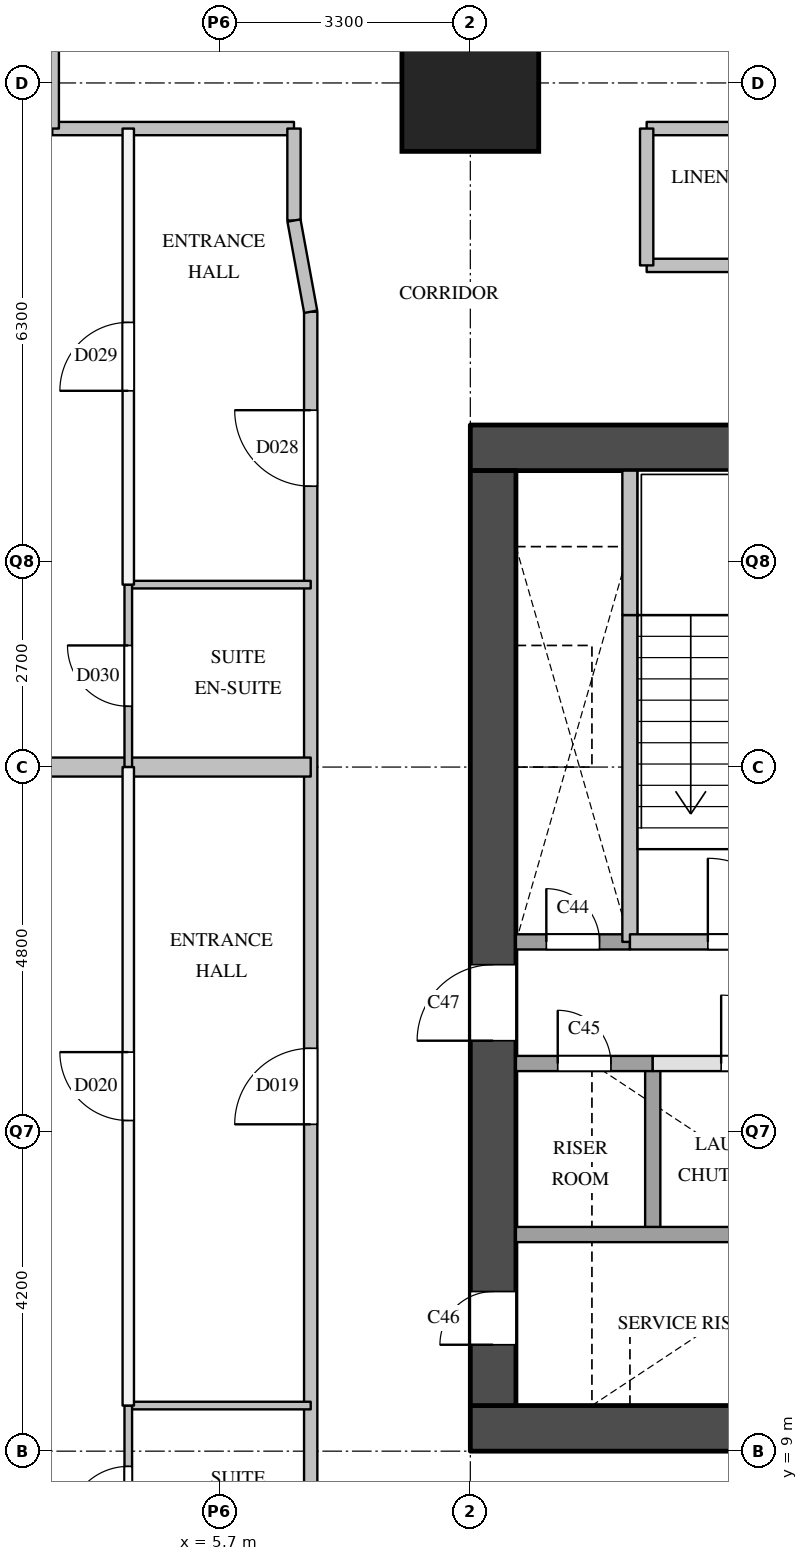
"""IFC4 building model, lengths in metres.
Left out: names, types, materials, properties, quantities, classifications, styles, units other than length and angle.
Written with IfcOpenShell. Run it as: python <this file> out.ifc"""

import sys

from ifc_helpers import new_model, si_unit, direction, frame, frame_2d, origin, origin_2d, place, context, subcontext, project, spatial, rectangle, extrude, element, fill, save


model = new_model("IFC4")
c1 = context("Model", 3, precision=1e-05, world=origin(), true_north=direction((0.0, 1.0)))
c2 = subcontext(c1, "Body", "Model", "MODEL_VIEW")
j1 = project(units=[si_unit("LENGTHUNIT", "METRE"), si_unit("PLANEANGLEUNIT", "RADIAN")], contexts=[c1])
p1 = place(None, origin())
s1 = spatial("IfcSite", under=j1, at=p1, CompositionType="ELEMENT")
p2 = place(p1, origin())
s2 = spatial("IfcBuilding", under=s1, at=p2, CompositionType="ELEMENT")
p3 = place(p2, frame((0.0, 0.0, 69.0)))
s3 = spatial("IfcBuildingStorey", under=s2, at=p3, CompositionType="ELEMENT", Elevation=69.0)
p4 = place(p3, frame((9.0, 27.0, 0.0), z_axis=(0.0, 0.0, 1.0), x_axis=(1.0, 0.0, 0.0)))
e1 = element("IfcColumn", 1, at=p4, inside=s3, PredefinedType="COLUMN", context=c2, shape_type="SweptSolid", body=[
    extrude(rectangle(XDim=1.8, YDim=1.8, at=origin_2d()), origin(), (0.0, 0.0, 1.0), 3.8),
])
for number, where, z_axis, x_axis in (
    (2, (9.0, 9.3, 0.0), (0.0, 0.0, 1.0), (1.0, 0.0, 0.0)),
    (3, (9.0, 22.2, 0.0), (0.0, 0.0, 1.0), (1.0, 0.0, 0.0)),
):
    element("IfcWall", number, at=place(p3, frame(where, z_axis=z_axis, x_axis=x_axis)), inside=s3, PredefinedType="SHEAR", context=c2, shape_type="SweptSolid", body=[
        extrude(rectangle(XDim=9.0, YDim=0.6, at=frame_2d((4.5, 0.0))), origin(), (0.0, 0.0, 1.0), 3.5),
    ])
p5 = place(p3, frame((9.3, 9.6, 0.0), z_axis=(0.0, 0.0, 1.0), x_axis=(0.0, 1.0, 0.0)))
e4 = element("IfcWall", 4, at=p5, inside=s3, PredefinedType="SHEAR", context=c2, shape_type="SweptSolid", body=[
    extrude(rectangle(XDim=12.3, YDim=0.6, at=frame_2d((6.15, 0.0))), origin(), (0.0, 0.0, 1.0), 3.5),
])
p6 = place(p5, frame((0.8, 0.0, 0.0)))
e5 = element("IfcOpeningElement", 5, at=p6, cuts=e4, PredefinedType="OPENING", context=c2, shape_type="SweptSolid", body=[
    extrude(rectangle(XDim=0.7, YDim=2.1, at=frame_2d((0.35, 1.05))), frame((0.0, 0.31, 0.0), z_axis=(0.0, -1.0, 0.0), x_axis=(1.0, 0.0, 0.0)), (0.0, 0.0, 1.0), 0.62),
])
p7 = place(p5, frame((4.8, 0.0, 0.0)))
e6 = element("IfcOpeningElement", 6, at=p7, cuts=e4, PredefinedType="OPENING", context=c2, shape_type="SweptSolid", body=[
    extrude(rectangle(XDim=1.0, YDim=2.1, at=frame_2d((0.5, 1.05))), frame((0.0, 0.31, 0.0), z_axis=(0.0, -1.0, 0.0), x_axis=(1.0, 0.0, 0.0)), (0.0, 0.0, 1.0), 0.62),
])
p8 = place(p3, frame((11.1, 15.7, 0.0), z_axis=(0.0, 0.0, 1.0), x_axis=(0.0, 1.0, 0.0)))
e7 = element("IfcWall", 7, at=p8, inside=s3, PredefinedType="SOLIDWALL", context=c2, shape_type="SweptSolid", body=[
    extrude(rectangle(XDim=4.3, YDim=0.2, at=frame_2d((2.15, 0.0))), origin(), (0.0, 0.0, 1.0), 3.5),
])
p9 = place(p3, frame((11.1, 20.0, 0.0), z_axis=(0.0, 0.0, 1.0), x_axis=(0.0, 1.0, 0.0)))
e8 = element("IfcWall", 8, at=p9, inside=s3, PredefinedType="SOLIDWALL", context=c2, shape_type="SweptSolid", body=[
    extrude(rectangle(XDim=1.9, YDim=0.2, at=frame_2d((0.95, 0.0))), origin(), (0.0, 0.0, 1.0), 3.5),
])
p10 = place(p3, frame((11.4, 11.9, 0.0), z_axis=(0.0, 0.0, 1.0), x_axis=(0.0, 1.0, 0.0)))
e9 = element("IfcWall", 9, at=p10, inside=s3, PredefinedType="SOLIDWALL", context=c2, shape_type="SweptSolid", body=[
    extrude(rectangle(XDim=2.2, YDim=0.2, at=frame_2d((1.1, 0.0))), origin(), (0.0, 0.0, 1.0), 3.5),
])
p11 = place(p3, frame((9.6, 11.85, 0.0), z_axis=(0.0, 0.0, 1.0), x_axis=(1.0, 0.0, 0.0)))
e10 = element("IfcWall", 10, at=p11, inside=s3, PredefinedType="SOLIDWALL", context=c2, shape_type="SweptSolid", body=[
    extrude(rectangle(XDim=7.8, YDim=0.2, at=frame_2d((3.9, 0.0))), origin(), (0.0, 0.0, 1.0), 3.5),
])
p12 = place(p3, frame((11.4, 14.1, 0.0), z_axis=(0.0, 0.0, 1.0), x_axis=(1.0, 0.0, 0.0)))
e11 = element("IfcWall", 11, at=p12, inside=s3, PredefinedType="PARTITIONING", context=c2, shape_type="SweptSolid", body=[
    extrude(rectangle(XDim=6.0, YDim=0.2, at=frame_2d((3.0, 0.0))), origin(), (0.0, 0.0, 1.0), 3.5),
])
p13 = place(p12, frame((0.9, 0.0, 0.0)))
e12 = element("IfcOpeningElement", 12, at=p13, cuts=e11, PredefinedType="OPENING", context=c2, shape_type="SweptSolid", body=[
    extrude(rectangle(XDim=0.9, YDim=2.1, at=frame_2d((0.45, 1.05))), frame((0.0, 0.11, 0.0), z_axis=(0.0, -1.0, 0.0), x_axis=(1.0, 0.0, 0.0)), (0.0, 0.0, 1.0), 0.22),
])
p14 = place(p12, frame((3.9, 0.0, 0.0)))
e13 = element("IfcOpeningElement", 13, at=p14, cuts=e11, PredefinedType="OPENING", context=c2, shape_type="SweptSolid", body=[
    extrude(rectangle(XDim=0.9, YDim=2.1, at=frame_2d((0.45, 1.05))), frame((0.0, 0.11, 0.0), z_axis=(0.0, -1.0, 0.0), x_axis=(1.0, 0.0, 0.0)), (0.0, 0.0, 1.0), 0.22),
])
p15 = place(p3, frame((9.6, 14.1, 0.0), z_axis=(0.0, 0.0, 1.0), x_axis=(1.0, 0.0, 0.0)))
e14 = element("IfcWall", 14, at=p15, inside=s3, PredefinedType="SOLIDWALL", context=c2, shape_type="SweptSolid", body=[
    extrude(rectangle(XDim=1.8, YDim=0.2, at=frame_2d((0.9, 0.0))), origin(), (0.0, 0.0, 1.0), 3.5),
])
p16 = place(p15, frame((0.55, 0.0, 0.0)))
e15 = element("IfcOpeningElement", 15, at=p16, cuts=e14, PredefinedType="OPENING", context=c2, shape_type="SweptSolid", body=[
    extrude(rectangle(XDim=0.7, YDim=2.1, at=frame_2d((0.35, 1.05))), frame((0.0, 0.11, 0.0), z_axis=(0.0, -1.0, 0.0), x_axis=(1.0, 0.0, 0.0)), (0.0, 0.0, 1.0), 0.22),
])
p17 = place(p3, frame((9.6, 15.7, 0.0), z_axis=(0.0, 0.0, 1.0), x_axis=(1.0, 0.0, 0.0)))
e16 = element("IfcWall", 16, at=p17, inside=s3, PredefinedType="SOLIDWALL", context=c2, shape_type="SweptSolid", body=[
    extrude(rectangle(XDim=1.5, YDim=0.2, at=frame_2d((0.75, 0.0))), origin(), (0.0, 0.0, 1.0), 3.5),
])
p18 = place(p17, frame((0.4, 0.0, 0.0)))
e17 = element("IfcOpeningElement", 17, at=p18, cuts=e16, PredefinedType="OPENING", context=c2, shape_type="SweptSolid", body=[
    extrude(rectangle(XDim=0.7, YDim=2.1, at=frame_2d((0.35, 1.05))), frame((0.0, 0.11, 0.0), z_axis=(0.0, -1.0, 0.0), x_axis=(1.0, 0.0, 0.0)), (0.0, 0.0, 1.0), 0.22),
])
p19 = place(p3, frame((11.1, 15.7, 0.0), z_axis=(0.0, 0.0, 1.0), x_axis=(1.0, 0.0, 0.0)))
e18 = element("IfcWall", 18, at=p19, inside=s3, PredefinedType="SOLIDWALL", context=c2, shape_type="SweptSolid", body=[
    extrude(rectangle(XDim=6.3, YDim=0.2, at=frame_2d((3.15, 0.0))), origin(), (0.0, 0.0, 1.0), 3.5),
])
p20 = place(p19, frame((4.175, 0.0, 0.0)))
e19 = element("IfcOpeningElement", 19, at=p20, cuts=e18, PredefinedType="OPENING", context=c2, shape_type="SweptSolid", body=[
    extrude(rectangle(XDim=1.1, YDim=2.1, at=frame_2d((0.55, 1.05))), frame((0.0, 0.11, 0.0), z_axis=(0.0, -1.0, 0.0), x_axis=(1.0, 0.0, 0.0)), (0.0, 0.0, 1.0), 0.22),
])
p21 = place(p19, frame((1.025, 0.0, 0.0)))
e20 = element("IfcOpeningElement", 20, at=p21, cuts=e18, PredefinedType="OPENING", context=c2, shape_type="SweptSolid", body=[
    extrude(rectangle(XDim=1.1, YDim=2.1, at=frame_2d((0.55, 1.05))), frame((0.0, 0.11, 0.0), z_axis=(0.0, -1.0, 0.0), x_axis=(1.0, 0.0, 0.0)), (0.0, 0.0, 1.0), 0.22),
])
p22 = place(p3, frame((11.32, 24.6, 0.0), z_axis=(0.0, 0.0, 1.0), x_axis=(1.0, 0.0, 0.0)))
e21 = element("IfcWall", 21, at=p22, inside=s3, PredefinedType="PARTITIONING", context=c2, shape_type="SweptSolid", body=[
    extrude(rectangle(XDim=4.36, YDim=0.175, at=frame_2d((2.18, 0.0))), origin(), (0.0, 0.0, 1.0), 3.5),
])
p23 = place(p22, frame((1.68, 0.0, 0.0)))
e22 = element("IfcOpeningElement", 22, at=p23, cuts=e21, PredefinedType="OPENING", context=c2, shape_type="SweptSolid", body=[
    extrude(rectangle(XDim=1.0, YDim=2.1, at=frame_2d((0.5, 1.05))), frame((0.0, 0.097, 0.0), z_axis=(0.0, -1.0, 0.0), x_axis=(1.0, 0.0, 0.0)), (0.0, 0.0, 1.0), 0.195),
])
p24 = place(p3, frame((3.5, 26.4, 0.0), z_axis=(0.0, 0.0, 1.0), x_axis=(1.0, 0.0, 0.0)))
e23 = element("IfcWall", 23, at=p24, inside=s3, PredefinedType="PARTITIONING", context=c2, shape_type="SweptSolid", body=[
    extrude(rectangle(XDim=3.18, YDim=0.175, at=frame_2d((1.59, 0.0))), origin(), (0.0, 0.0, 1.0), 3.5),
])
p25 = place(p3, frame((11.32, 26.4, 0.0), z_axis=(0.0, 0.0, 1.0), x_axis=(1.0, 0.0, 0.0)))
e24 = element("IfcWall", 24, at=p25, inside=s3, PredefinedType="PARTITIONING", context=c2, shape_type="SweptSolid", body=[
    extrude(rectangle(XDim=4.36, YDim=0.175, at=frame_2d((2.18, 0.0))), origin(), (0.0, 0.0, 1.0), 3.5),
])
p26 = place(p3, frame((3.5, 26.4, 0.0), z_axis=(0.0, 0.0, 1.0), x_axis=(0.0, 1.0, 0.0)))
e25 = element("IfcWall", 25, at=p26, inside=s3, PredefinedType="PARTITIONING", context=c2, shape_type="SweptSolid", body=[
    extrude(rectangle(XDim=25.7, YDim=0.175, at=frame_2d((12.85, 0.0))), origin(), (0.0, 0.0, 1.0), 2.5),
])
p27 = place(p26, frame((5.55, 0.0, 0.0)))
e26 = element("IfcOpeningElement", 26, at=p27, cuts=e25, PredefinedType="OPENING", context=c2, shape_type="SweptSolid", body=[
    extrude(rectangle(XDim=0.9, YDim=2.1, at=frame_2d((0.45, 1.05))), frame((0.0, 0.097, 0.0), z_axis=(0.0, -1.0, 0.0), x_axis=(1.0, 0.0, 0.0)), (0.0, 0.0, 1.0), 0.195),
])
p28 = place(p26, frame((17.2, 0.0, 0.0)))
e27 = element("IfcOpeningElement", 27, at=p28, cuts=e25, PredefinedType="OPENING", context=c2, shape_type="SweptSolid", body=[
    extrude(rectangle(XDim=0.9, YDim=2.1, at=frame_2d((0.45, 1.05))), frame((0.0, 0.097, 0.0), z_axis=(0.0, -1.0, 0.0), x_axis=(1.0, 0.0, 0.0)), (0.0, 0.0, 1.0), 0.195),
])
p29 = place(p3, frame((6.68, 25.19, 0.0), z_axis=(0.0, 0.0, 1.0), x_axis=(0.0, 1.0, 0.0)))
e28 = element("IfcWall", 28, at=p29, inside=s3, PredefinedType="PARTITIONING", context=c2, shape_type="SweptSolid", body=[
    extrude(rectangle(XDim=1.21, YDim=0.175, at=frame_2d((0.605, 0.0))), origin(), (0.0, 0.0, 1.0), 3.5),
])
p30 = place(p3, frame((6.9, 6.9, 0.0), z_axis=(0.0, 0.0, 1.0), x_axis=(0.0, 1.0, 0.0)))
e29 = element("IfcWall", 29, at=p30, inside=s3, PredefinedType="PARTITIONING", context=c2, shape_type="SweptSolid", body=[
    extrude(rectangle(XDim=17.09, YDim=0.175, at=frame_2d((8.545, 0.0))), origin(), (0.0, 0.0, 1.0), 3.5),
])
p31 = place(p30, frame((6.4, 0.0, 0.0)))
e30 = element("IfcOpeningElement", 30, at=p31, cuts=e29, PredefinedType="OPENING", context=c2, shape_type="SweptSolid", body=[
    extrude(rectangle(XDim=1.0, YDim=2.1, at=frame_2d((0.5, 1.05))), frame((0.0, 0.097, 0.0), z_axis=(0.0, -1.0, 0.0), x_axis=(1.0, 0.0, 0.0)), (0.0, 0.0, 1.0), 0.195),
])
p32 = place(p30, frame((14.795, 0.0, 0.0)))
e31 = element("IfcOpeningElement", 31, at=p32, cuts=e29, PredefinedType="OPENING", context=c2, shape_type="SweptSolid", body=[
    extrude(rectangle(XDim=1.0, YDim=2.1, at=frame_2d((0.5, 1.05))), frame((0.0, 0.097, 0.0), z_axis=(0.0, -1.0, 0.0), x_axis=(1.0, 0.0, 0.0)), (0.0, 0.0, 1.0), 0.195),
])
p33 = place(p3, frame((11.32, 24.6, 0.0), z_axis=(0.0, 0.0, 1.0), x_axis=(0.0, 1.0, 0.0)))
e32 = element("IfcWall", 32, at=p33, inside=s3, PredefinedType="PARTITIONING", context=c2, shape_type="SweptSolid", body=[
    extrude(rectangle(XDim=1.8, YDim=0.175, at=frame_2d((0.9, 0.0))), origin(), (0.0, 0.0, 1.0), 3.5),
])
p34 = place(p3, frame((4.5, 9.6, 0.0), z_axis=(0.0, 0.0, 1.0), x_axis=(0.0, 1.0, 0.0)))
e33 = element("IfcWall", 33, at=p34, inside=s3, PredefinedType="PARTITIONING", context=c2, shape_type="SweptSolid", body=[
    extrude(rectangle(XDim=8.4, YDim=0.15, at=frame_2d((4.2, 0.0))), origin(), (0.0, 0.0, 1.0), 3.5),
])
p35 = place(p34, frame((3.75, 0.0, 0.0)))
e34 = element("IfcOpeningElement", 34, at=p35, cuts=e33, PredefinedType="OPENING", context=c2, shape_type="SweptSolid", body=[
    extrude(rectangle(XDim=0.9, YDim=2.1, at=frame_2d((0.45, 1.05))), frame((0.0, 0.085, 0.0), z_axis=(0.0, -1.0, 0.0), x_axis=(1.0, 0.0, 0.0)), (0.0, 0.0, 1.0), 0.17),
])
p36 = place(p3, frame((4.5, 20.4, 0.0), z_axis=(0.0, 0.0, 1.0), x_axis=(0.0, 1.0, 0.0)))
e35 = element("IfcWall", 35, at=p36, inside=s3, PredefinedType="PARTITIONING", context=c2, shape_type="SweptSolid", body=[
    extrude(rectangle(XDim=6.0, YDim=0.15, at=frame_2d((3.0, 0.0))), origin(), (0.0, 0.0, 1.0), 3.5),
])
p37 = place(p36, frame((2.55, 0.0, 0.0)))
e36 = element("IfcOpeningElement", 36, at=p37, cuts=e35, PredefinedType="OPENING", context=c2, shape_type="SweptSolid", body=[
    extrude(rectangle(XDim=0.9, YDim=2.1, at=frame_2d((0.45, 1.05))), frame((0.0, 0.085, 0.0), z_axis=(0.0, -1.0, 0.0), x_axis=(1.0, 0.0, 0.0)), (0.0, 0.0, 1.0), 0.17),
])
p38 = place(p3, frame((0.0, 18.0, 0.0), z_axis=(0.0, 0.0, 1.0), x_axis=(1.0, 0.0, 0.0)))
e37 = element("IfcWall", 37, at=p38, inside=s3, PredefinedType="PARTITIONING", context=c2, shape_type="SweptSolid", body=[
    extrude(rectangle(XDim=6.9, YDim=0.25, at=frame_2d((3.45, 0.0))), origin(), (0.0, 0.0, 1.0), 3.5),
])
for number, where, z_axis, x_axis in (
    (38, (4.5, 9.6, 0.0), (0.0, 0.0, 1.0), (1.0, 0.0, 0.0)),
    (39, (4.5, 20.4, 0.0), (0.0, 0.0, 1.0), (1.0, 0.0, 0.0)),
):
    element("IfcWall", number, at=place(p3, frame(where, z_axis=z_axis, x_axis=x_axis)), inside=s3, PredefinedType="PARTITIONING", context=c2, shape_type="SweptSolid", body=[
        extrude(rectangle(XDim=2.4, YDim=0.1, at=frame_2d((1.2, 0.0))), origin(), (0.0, 0.0, 1.0), 3.5),
    ])
p39 = place(p3, frame((4.5, 7.2, 0.0), z_axis=(0.0, 0.0, 1.0), x_axis=(0.0, 1.0, 0.0)))
e40 = element("IfcWall", 40, at=p39, inside=s3, PredefinedType="PARTITIONING", context=c2, shape_type="SweptSolid", body=[
    extrude(rectangle(XDim=2.4, YDim=0.1, at=frame_2d((1.2, 0.0))), origin(), (0.0, 0.0, 1.0), 3.5),
])
p40 = place(p39, frame((0.8, 0.0, 0.0)))
e41 = element("IfcOpeningElement", 41, at=p40, cuts=e40, PredefinedType="OPENING", context=c2, shape_type="SweptSolid", body=[
    extrude(rectangle(XDim=0.8, YDim=2.1, at=frame_2d((0.4, 1.05))), frame((0.0, 0.06, 0.0), z_axis=(0.0, -1.0, 0.0), x_axis=(1.0, 0.0, 0.0)), (0.0, 0.0, 1.0), 0.12),
])
p41 = place(p3, frame((4.5, 18.0, 0.0), z_axis=(0.0, 0.0, 1.0), x_axis=(0.0, 1.0, 0.0)))
e42 = element("IfcWall", 42, at=p41, inside=s3, PredefinedType="PARTITIONING", context=c2, shape_type="SweptSolid", body=[
    extrude(rectangle(XDim=2.4, YDim=0.1, at=frame_2d((1.2, 0.0))), origin(), (0.0, 0.0, 1.0), 3.5),
])
p42 = place(p41, frame((0.8, 0.0, 0.0)))
e43 = element("IfcOpeningElement", 43, at=p42, cuts=e42, PredefinedType="OPENING", context=c2, shape_type="SweptSolid", body=[
    extrude(rectangle(XDim=0.8, YDim=2.1, at=frame_2d((0.4, 1.05))), frame((0.0, 0.06, 0.0), z_axis=(0.0, -1.0, 0.0), x_axis=(1.0, 0.0, 0.0)), (0.0, 0.0, 1.0), 0.12),
])
p43 = place(p3, frame((6.9, 23.99, 0.0), z_axis=(0.0, 0.0, 1.0), x_axis=(-0.180311734132, 0.983609515272, 0.0)))
e44 = element("IfcWall", 44, at=p43, inside=s3, PredefinedType="PARTITIONING", context=c2, shape_type="SweptSolid", body=[
    extrude(rectangle(XDim=1.22, YDim=0.175, at=frame_2d((0.61, 0.0))), origin(), (0.0, 0.0, 1.0), 3.5),
])
p44 = place(p21, origin())
e45 = element("IfcDoor", 45, at=p44, inside=s3, OperationType="SINGLE_SWING_LEFT", PredefinedType="DOOR", context=c2, shape_type="SweptSolid", body=[
    extrude(rectangle(XDim=1.1, YDim=2.1, at=frame_2d((0.55, 1.05))), frame((0.0, 0.025, 0.0), z_axis=(0.0, -1.0, 0.0), x_axis=(1.0, 0.0, 0.0)), (0.0, 0.0, 1.0), 0.05),
])
fill(e20, e45)
p45 = place(p18, origin())
e46 = element("IfcDoor", 46, at=p45, inside=s3, OperationType="SINGLE_SWING_LEFT", PredefinedType="DOOR", context=c2, shape_type="SweptSolid", body=[
    extrude(rectangle(XDim=0.7, YDim=2.1, at=frame_2d((0.35, 1.05))), frame((0.0, 0.025, 0.0), z_axis=(0.0, -1.0, 0.0), x_axis=(1.0, 0.0, 0.0)), (0.0, 0.0, 1.0), 0.05),
])
fill(e17, e46)
p46 = place(p16, origin())
e47 = element("IfcDoor", 47, at=p46, inside=s3, OperationType="SINGLE_SWING_LEFT", PredefinedType="DOOR", context=c2, shape_type="SweptSolid", body=[
    extrude(rectangle(XDim=0.7, YDim=2.1, at=frame_2d((0.35, 1.05))), frame((0.0, 0.025, 0.0), z_axis=(0.0, -1.0, 0.0), x_axis=(1.0, 0.0, 0.0)), (0.0, 0.0, 1.0), 0.05),
])
fill(e15, e47)
p47 = place(p6, origin())
e48 = element("IfcDoor", 48, at=p47, inside=s3, OperationType="SINGLE_SWING_LEFT", PredefinedType="DOOR", context=c2, shape_type="SweptSolid", body=[
    extrude(rectangle(XDim=0.7, YDim=2.1, at=frame_2d((0.35, 1.05))), frame((0.0, 0.025, 0.0), z_axis=(0.0, -1.0, 0.0), x_axis=(1.0, 0.0, 0.0)), (0.0, 0.0, 1.0), 0.05),
])
fill(e5, e48)
p48 = place(p7, origin())
e49 = element("IfcDoor", 49, at=p48, inside=s3, OperationType="SINGLE_SWING_LEFT", PredefinedType="DOOR", context=c2, shape_type="SweptSolid", body=[
    extrude(rectangle(XDim=1.0, YDim=2.1, at=frame_2d((0.5, 1.05))), frame((0.0, 0.025, 0.0), z_axis=(0.0, -1.0, 0.0), x_axis=(1.0, 0.0, 0.0)), (0.0, 0.0, 1.0), 0.05),
])
fill(e6, e49)
p49 = place(p13, origin())
e50 = element("IfcDoor", 50, at=p49, inside=s3, OperationType="SINGLE_SWING_LEFT", PredefinedType="DOOR", context=c2, shape_type="SweptSolid", body=[
    extrude(rectangle(XDim=0.9, YDim=2.1, at=frame_2d((0.45, 1.05))), frame((0.0, 0.025, 0.0), z_axis=(0.0, -1.0, 0.0), x_axis=(1.0, 0.0, 0.0)), (0.0, 0.0, 1.0), 0.05),
])
fill(e12, e50)
p50 = place(p31, origin())
e51 = element("IfcDoor", 51, at=p50, inside=s3, OperationType="SINGLE_SWING_LEFT", PredefinedType="DOOR", context=c2, shape_type="SweptSolid", body=[
    extrude(rectangle(XDim=1.0, YDim=2.1, at=frame_2d((0.5, 1.05))), frame((0.0, 0.025, 0.0), z_axis=(0.0, -1.0, 0.0), x_axis=(1.0, 0.0, 0.0)), (0.0, 0.0, 1.0), 0.05),
])
fill(e30, e51)
p51 = place(p35, origin())
e52 = element("IfcDoor", 52, at=p51, inside=s3, OperationType="SINGLE_SWING_RIGHT", PredefinedType="DOOR", context=c2, shape_type="SweptSolid", body=[
    extrude(rectangle(XDim=0.9, YDim=2.1, at=frame_2d((0.45, 1.05))), frame((0.0, 0.025, 0.0), z_axis=(0.0, -1.0, 0.0), x_axis=(1.0, 0.0, 0.0)), (0.0, 0.0, 1.0), 0.05),
])
fill(e34, e52)
p52 = place(p40, origin())
e53 = element("IfcDoor", 53, at=p52, inside=s3, OperationType="SINGLE_SWING_LEFT", PredefinedType="DOOR", context=c2, shape_type="SweptSolid", body=[
    extrude(rectangle(XDim=0.8, YDim=2.1, at=frame_2d((0.4, 1.05))), frame((0.0, 0.025, 0.0), z_axis=(0.0, -1.0, 0.0), x_axis=(1.0, 0.0, 0.0)), (0.0, 0.0, 1.0), 0.05),
])
fill(e41, e53)
p53 = place(p32, origin())
e54 = element("IfcDoor", 54, at=p53, inside=s3, OperationType="SINGLE_SWING_RIGHT", PredefinedType="DOOR", context=c2, shape_type="SweptSolid", body=[
    extrude(rectangle(XDim=1.0, YDim=2.1, at=frame_2d((0.5, 1.05))), frame((0.0, 0.025, 0.0), z_axis=(0.0, -1.0, 0.0), x_axis=(1.0, 0.0, 0.0)), (0.0, 0.0, 1.0), 0.05),
])
fill(e31, e54)
p54 = place(p37, origin())
e55 = element("IfcDoor", 55, at=p54, inside=s3, OperationType="SINGLE_SWING_LEFT", PredefinedType="DOOR", context=c2, shape_type="SweptSolid", body=[
    extrude(rectangle(XDim=0.9, YDim=2.1, at=frame_2d((0.45, 1.05))), frame((0.0, 0.025, 0.0), z_axis=(0.0, -1.0, 0.0), x_axis=(1.0, 0.0, 0.0)), (0.0, 0.0, 1.0), 0.05),
])
fill(e36, e55)
p55 = place(p42, origin())
e56 = element("IfcDoor", 56, at=p55, inside=s3, OperationType="SINGLE_SWING_RIGHT", PredefinedType="DOOR", context=c2, shape_type="SweptSolid", body=[
    extrude(rectangle(XDim=0.8, YDim=2.1, at=frame_2d((0.4, 1.05))), frame((0.0, 0.025, 0.0), z_axis=(0.0, -1.0, 0.0), x_axis=(1.0, 0.0, 0.0)), (0.0, 0.0, 1.0), 0.05),
])
fill(e43, e56)
save(model, sys.argv[1])
